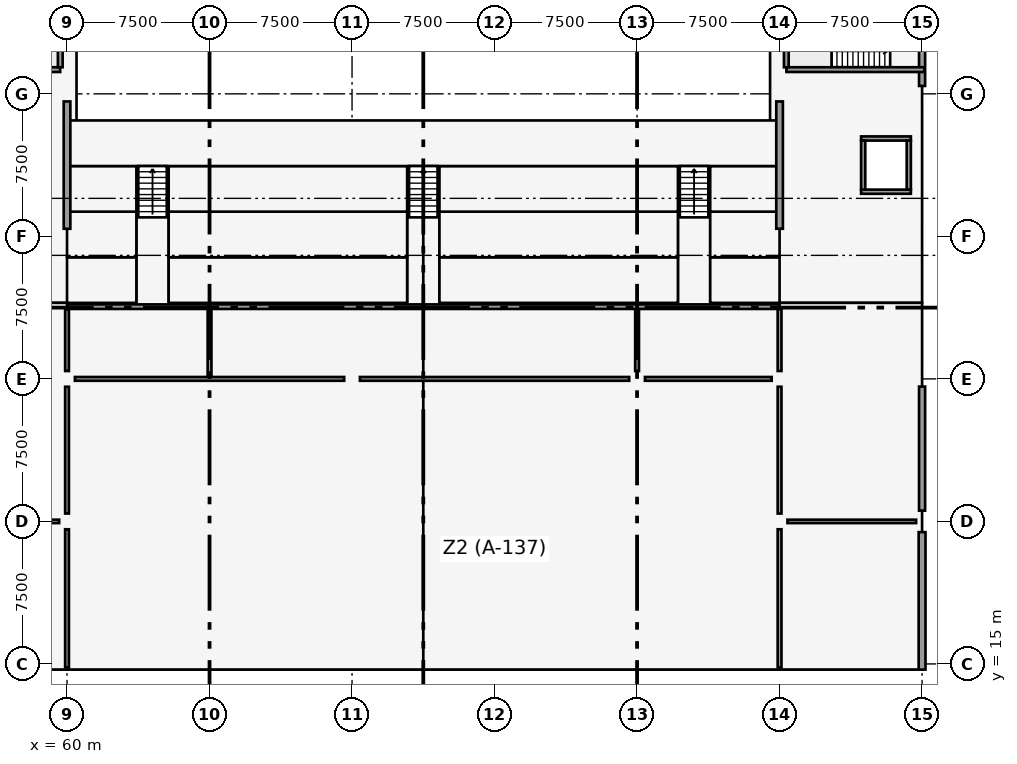
"""IFC4 building model, lengths in metres.
Left out: names, types, materials, properties, quantities, classifications, styles, units other than length and angle.
Written with IfcOpenShell. Run it as: python <this file> out.ifc"""

import sys

from ifc_helpers import new_model, si_unit, direction, frame, frame_2d, origin, origin_2d, place, context, subcontext, project, spatial, rectangle, extrude, element, fill, save


model = new_model("IFC4")
c1 = context("Model", 3, precision=1e-05, world=origin(), true_north=direction((0.0, 1.0)))
c2 = subcontext(c1, "Body", "Model", "MODEL_VIEW")
j1 = project(units=[si_unit("LENGTHUNIT", "METRE"), si_unit("PLANEANGLEUNIT", "RADIAN")], contexts=[c1])
p1 = place(None, origin())
s1 = spatial("IfcSite", under=j1, at=p1, CompositionType="ELEMENT")
p2 = place(p1, origin())
s2 = spatial("IfcBuilding", under=s1, at=p2, CompositionType="ELEMENT")
p3 = place(p2, frame((0.0, 0.0, 9.0)))
s3 = spatial("IfcBuildingStorey", under=s2, at=p3, CompositionType="ELEMENT", Elevation=9.0)
for number, where, z_axis, x_axis in (
    (1, (60.0, 22.5, 0.0), (0.0, 0.0, 1.0), (1.0, 0.0, 0.0)),
    (2, (60.0, 30.0, 0.0), (0.0, 0.0, 1.0), (1.0, 0.0, 0.0)),
    (3, (60.0, 37.5, 0.0), (0.0, 0.0, 1.0), (1.0, 0.0, 0.0)),
    (4, (60.0, 45.0, 0.0), (0.0, 0.0, 1.0), (1.0, 0.0, 0.0)),
    (5, (75.0, 22.5, 0.0), (0.0, 0.0, 1.0), (1.0, 0.0, 0.0)),
    (6, (75.0, 30.0, 0.0), (0.0, 0.0, 1.0), (1.0, 0.0, 0.0)),
    (7, (90.0, 22.5, 0.0), (0.0, 0.0, 1.0), (1.0, 0.0, 0.0)),
    (8, (90.0, 30.0, 0.0), (0.0, 0.0, 1.0), (1.0, 0.0, 0.0)),
    (9, (97.5, 22.5, 0.0), (0.0, 0.0, 1.0), (1.0, 0.0, 0.0)),
    (10, (97.5, 30.0, 0.0), (0.0, 0.0, 1.0), (1.0, 0.0, 0.0)),
    (11, (97.5, 37.5, 0.0), (0.0, 0.0, 1.0), (1.0, 0.0, 0.0)),
    (12, (97.5, 45.0, 0.0), (0.0, 0.0, 1.0), (1.0, 0.0, 0.0)),
):
    element("IfcColumn", number, at=place(p3, frame(where, z_axis=z_axis, x_axis=x_axis)), inside=s3, PredefinedType="COLUMN", context=c2, shape_type="SweptSolid", body=[
        extrude(rectangle(XDim=0.8, YDim=0.8, at=origin_2d()), origin(), (0.0, 0.0, 1.0), 4.2),
    ])
p4 = place(p3, frame((105.0, 22.5, 0.0), z_axis=(0.0, 0.0, 1.0), x_axis=(1.0, 0.0, 0.0)))
e13 = element("IfcColumn", 13, at=p4, inside=s3, PredefinedType="COLUMN", context=c2, shape_type="SweptSolid", body=[
    extrude(rectangle(XDim=0.6, YDim=1.1, at=origin_2d()), origin(), (0.0, 0.0, 1.0), 4.2),
])
for number, where, z_axis, x_axis in (
    (14, (105.0, 30.0, 0.0), (0.0, 0.0, 1.0), (1.0, 0.0, 0.0)),
    (15, (105.0, 37.5, 0.0), (0.0, 0.0, 1.0), (1.0, 0.0, 0.0)),
    (16, (105.0, 45.0, 0.0), (0.0, 0.0, 1.0), (1.0, 0.0, 0.0)),
):
    element("IfcColumn", number, at=place(p3, frame(where, z_axis=z_axis, x_axis=x_axis)), inside=s3, PredefinedType="COLUMN", context=c2, shape_type="SweptSolid", body=[
        extrude(rectangle(XDim=0.8, YDim=0.8, at=origin_2d()), origin(), (0.0, 0.0, 1.0), 4.2),
    ])
for number, where, z_axis, x_axis in (
    (17, (60.0, 37.9, 0.0), (0.0, 0.0, 1.0), (0.0, 1.0, 0.0)),
    (18, (97.5, 37.9, 0.0), (0.0, 0.0, 1.0), (0.0, 1.0, 0.0)),
):
    element("IfcWall", number, at=place(p3, frame(where, z_axis=z_axis, x_axis=x_axis)), inside=s3, PredefinedType="SHEAR", context=c2, shape_type="SweptSolid", body=[
        extrude(rectangle(XDim=6.7, YDim=0.35, at=frame_2d((3.35, 0.0))), origin(), (0.0, 0.0, 1.0), 2.72),
    ])
p5 = place(p3, frame((105.0, 14.7, 0.0), z_axis=(0.0, 0.0, 1.0), x_axis=(0.0, 1.0, 0.0)))
e19 = element("IfcWall", 19, at=p5, inside=s3, PredefinedType="SOLIDWALL", context=c2, shape_type="SweptSolid", body=[
    extrude(rectangle(XDim=7.235, YDim=0.36, at=frame_2d((3.618, 0.0))), origin(), (0.0, 0.0, 1.0), 2.69),
])
p6 = place(p3, frame((105.0, 23.065, 0.0), z_axis=(0.0, 0.0, 1.0), x_axis=(0.0, 1.0, 0.0)))
e20 = element("IfcWall", 20, at=p6, inside=s3, PredefinedType="SOLIDWALL", context=c2, shape_type="SweptSolid", body=[
    extrude(rectangle(XDim=6.53, YDim=0.32, at=frame_2d((3.265, 0.0))), origin(), (0.0, 0.0, 1.0), 2.69),
])
p7 = place(p3, frame((105.0, 45.415, 0.0), z_axis=(0.0, 0.0, 1.0), x_axis=(0.0, 1.0, 0.0)))
e21 = element("IfcWall", 21, at=p7, inside=s3, PredefinedType="SOLIDWALL", context=c2, shape_type="SweptSolid", body=[
    extrude(rectangle(XDim=6.67, YDim=0.32, at=frame_2d((3.335, 0.0))), origin(), (0.0, 0.0, 1.0), 2.92),
])
p8 = place(p3, frame((52.38, 46.275, 0.0), z_axis=(0.0, 0.0, 1.0), x_axis=(1.0, 0.0, 0.0)))
e22 = element("IfcWall", 22, at=p8, inside=s3, PredefinedType="SOLIDWALL", context=c2, shape_type="SweptSolid", body=[
    extrude(rectangle(XDim=7.26, YDim=0.25, at=frame_2d((3.63, 0.0))), origin(), (0.0, 0.0, 1.0), 3.92),
])
p9 = place(p8, frame((0.62, 0.0, 0.0)))
e23 = element("IfcOpeningElement", 23, at=p9, cuts=e22, PredefinedType="OPENING", context=c2, shape_type="SweptSolid", body=[
    extrude(rectangle(XDim=1.1, YDim=2.15, at=frame_2d((0.55, 1.075))), frame((0.0, 0.135, 0.0), z_axis=(0.0, -1.0, 0.0), x_axis=(1.0, 0.0, 0.0)), (0.0, 0.0, 1.0), 0.27),
])
p10 = place(p3, frame((59.645, 46.4, 0.0), z_axis=(0.0, 0.0, 1.0), x_axis=(0.0, 1.0, 0.0)))
e24 = element("IfcWall", 24, at=p10, inside=s3, PredefinedType="SOLIDWALL", context=c2, shape_type="SweptSolid", body=[
    extrude(rectangle(XDim=3.56, YDim=0.25, at=frame_2d((1.78, 0.0))), origin(), (0.0, 0.0, 1.0), 3.92),
])
p11 = place(p3, frame((97.86, 46.275, 0.0), z_axis=(0.0, 0.0, 1.0), x_axis=(1.0, 0.0, 0.0)))
e25 = element("IfcWall", 25, at=p11, inside=s3, PredefinedType="SOLIDWALL", context=c2, shape_type="SweptSolid", body=[
    extrude(rectangle(XDim=7.26, YDim=0.25, at=frame_2d((3.63, 0.0))), origin(), (0.0, 0.0, 1.0), 3.92),
])
p12 = place(p11, frame((5.54, 0.0, 0.0)))
e26 = element("IfcOpeningElement", 26, at=p12, cuts=e25, PredefinedType="OPENING", context=c2, shape_type="SweptSolid", body=[
    extrude(rectangle(XDim=1.1, YDim=2.15, at=frame_2d((0.55, 1.075))), frame((0.0, 0.135, 0.0), z_axis=(0.0, -1.0, 0.0), x_axis=(1.0, 0.0, 0.0)), (0.0, 0.0, 1.0), 0.27),
])
p13 = place(p3, frame((97.855, 46.4, 0.0), z_axis=(0.0, 0.0, 1.0), x_axis=(0.0, 1.0, 0.0)))
e27 = element("IfcWall", 27, at=p13, inside=s3, PredefinedType="SOLIDWALL", context=c2, shape_type="SweptSolid", body=[
    extrude(rectangle(XDim=3.56, YDim=0.25, at=frame_2d((1.78, 0.0))), origin(), (0.0, 0.0, 1.0), 3.92),
])
for number, where, z_axis, x_axis in (
    (28, (101.79, 39.85, 0.0), (0.0, 0.0, 1.0), (1.0, 0.0, 0.0)),
    (29, (101.79, 42.65, 0.0), (0.0, 0.0, 1.0), (1.0, 0.0, 0.0)),
):
    element("IfcWall", number, at=place(p3, frame(where, z_axis=z_axis, x_axis=x_axis)), inside=s3, PredefinedType="SOLIDWALL", context=c2, shape_type="SweptSolid", body=[
        extrude(rectangle(XDim=2.62, YDim=0.22, at=frame_2d((1.31, 0.0))), origin(), (0.0, 0.0, 1.0), 3.92),
    ])
p14 = place(p3, frame((101.9, 39.96, 0.0), z_axis=(0.0, 0.0, 1.0), x_axis=(0.0, 1.0, 0.0)))
e30 = element("IfcWall", 30, at=p14, inside=s3, PredefinedType="SOLIDWALL", context=c2, shape_type="SweptSolid", body=[
    extrude(rectangle(XDim=2.58, YDim=0.22, at=frame_2d((1.29, 0.0))), origin(), (0.0, 0.0, 1.0), 3.92),
])
p15 = place(p14, frame((0.79, 0.0, 0.0)))
e31 = element("IfcOpeningElement", 31, at=p15, cuts=e30, PredefinedType="OPENING", context=c2, shape_type="SweptSolid", body=[
    extrude(rectangle(XDim=1.0, YDim=2.15, at=frame_2d((0.5, 1.075))), frame((0.0, 0.12, 0.0), z_axis=(0.0, -1.0, 0.0), x_axis=(1.0, 0.0, 0.0)), (0.0, 0.0, 1.0), 0.24),
])
p16 = place(p3, frame((104.3, 39.96, 0.0), z_axis=(0.0, 0.0, 1.0), x_axis=(0.0, 1.0, 0.0)))
e32 = element("IfcWall", 32, at=p16, inside=s3, PredefinedType="SOLIDWALL", context=c2, shape_type="SweptSolid", body=[
    extrude(rectangle(XDim=2.58, YDim=0.22, at=frame_2d((1.29, 0.0))), origin(), (0.0, 0.0, 1.0), 3.92),
])
p17 = place(p3, frame((52.814, 22.5, 0.0), z_axis=(0.0, 0.0, 1.0), x_axis=(1.0, 0.0, 0.0)))
e33 = element("IfcWall", 33, at=p17, inside=s3, PredefinedType="PARTITIONING", context=c2, shape_type="SweptSolid", body=[
    extrude(rectangle(XDim=6.772, YDim=0.18, at=frame_2d((3.386, 0.0))), origin(), (0.0, 0.0, 1.0), 2.69),
])
p18 = place(p17, frame((2.786, 0.0, 0.0)))
e34 = element("IfcOpeningElement", 34, at=p18, cuts=e33, PredefinedType="OPENING", context=c2, shape_type="SweptSolid", body=[
    extrude(rectangle(XDim=1.3, YDim=2.15, at=frame_2d((0.65, 1.075))), frame((0.0, 0.1, 0.0), z_axis=(0.0, -1.0, 0.0), x_axis=(1.0, 0.0, 0.0)), (0.0, 0.0, 1.0), 0.2),
])
p19 = place(p3, frame((97.914, 22.5, 0.0), z_axis=(0.0, 0.0, 1.0), x_axis=(1.0, 0.0, 0.0)))
e35 = element("IfcWall", 35, at=p19, inside=s3, PredefinedType="PARTITIONING", context=c2, shape_type="SweptSolid", body=[
    extrude(rectangle(XDim=6.772, YDim=0.18, at=frame_2d((3.386, 0.0))), origin(), (0.0, 0.0, 1.0), 2.69),
])
p20 = place(p19, frame((2.686, 0.0, 0.0)))
e36 = element("IfcOpeningElement", 36, at=p20, cuts=e35, PredefinedType="OPENING", context=c2, shape_type="SweptSolid", body=[
    extrude(rectangle(XDim=1.3, YDim=2.15, at=frame_2d((0.65, 1.075))), frame((0.0, 0.1, 0.0), z_axis=(0.0, -1.0, 0.0), x_axis=(1.0, 0.0, 0.0)), (0.0, 0.0, 1.0), 0.2),
])
p21 = place(p3, frame((60.414, 30.0, 0.0), z_axis=(0.0, 0.0, 1.0), x_axis=(1.0, 0.0, 0.0)))
e37 = element("IfcWall", 37, at=p21, inside=s3, PredefinedType="PARTITIONING", context=c2, shape_type="SweptSolid", body=[
    extrude(rectangle(XDim=14.172, YDim=0.2, at=frame_2d((7.086, 0.0))), origin(), (0.0, 0.0, 1.0), 2.69),
])
p22 = place(p21, frame((2.586, 0.0, 0.0)))
e38 = element("IfcOpeningElement", 38, at=p22, cuts=e37, PredefinedType="OPENING", context=c2, shape_type="SweptSolid", body=[
    extrude(rectangle(XDim=1.5, YDim=2.16, at=frame_2d((0.75, 1.08))), frame((0.0, 0.11, 0.0), z_axis=(0.0, -1.0, 0.0), x_axis=(1.0, 0.0, 0.0)), (0.0, 0.0, 1.0), 0.22),
])
p23 = place(p3, frame((75.414, 30.0, 0.0), z_axis=(0.0, 0.0, 1.0), x_axis=(1.0, 0.0, 0.0)))
e39 = element("IfcWall", 39, at=p23, inside=s3, PredefinedType="PARTITIONING", context=c2, shape_type="SweptSolid", body=[
    extrude(rectangle(XDim=14.172, YDim=0.2, at=frame_2d((7.086, 0.0))), origin(), (0.0, 0.0, 1.0), 2.82),
])
p24 = place(p3, frame((90.414, 30.0, 0.0), z_axis=(0.0, 0.0, 1.0), x_axis=(1.0, 0.0, 0.0)))
e40 = element("IfcWall", 40, at=p24, inside=s3, PredefinedType="PARTITIONING", context=c2, shape_type="SweptSolid", body=[
    extrude(rectangle(XDim=6.672, YDim=0.2, at=frame_2d((3.336, 0.0))), origin(), (0.0, 0.0, 1.0), 2.69),
])
p25 = place(p24, frame((2.586, 0.0, 0.0)))
e41 = element("IfcOpeningElement", 41, at=p25, cuts=e40, PredefinedType="OPENING", context=c2, shape_type="SweptSolid", body=[
    extrude(rectangle(XDim=1.5, YDim=2.16, at=frame_2d((0.75, 1.08))), frame((0.0, 0.11, 0.0), z_axis=(0.0, -1.0, 0.0), x_axis=(1.0, 0.0, 0.0)), (0.0, 0.0, 1.0), 0.22),
])
p26 = place(p3, frame((60.0, 33.8, 0.0), z_axis=(0.0, 0.0, 1.0), x_axis=(1.0, 0.0, 0.0)))
e42 = element("IfcWall", 42, at=p26, inside=s3, PredefinedType="PARTITIONING", context=c2, shape_type="SweptSolid", body=[
    extrude(rectangle(XDim=37.5, YDim=0.24, at=frame_2d((18.75, 0.0))), origin(), (0.0, 0.0, 1.0), 2.69),
])
p27 = place(p26, frame((2.95, 0.0, 0.0)))
e43 = element("IfcOpeningElement", 43, at=p27, cuts=e42, PredefinedType="OPENING", context=c2, shape_type="SweptSolid", body=[
    extrude(rectangle(XDim=1.6, YDim=2.16, at=frame_2d((0.8, 1.08))), frame((0.0, 0.13, 0.0), z_axis=(0.0, -1.0, 0.0), x_axis=(1.0, 0.0, 0.0)), (0.0, 0.0, 1.0), 0.26),
])
p28 = place(p26, frame((32.95, 0.0, 0.0)))
e44 = element("IfcOpeningElement", 44, at=p28, cuts=e42, PredefinedType="OPENING", context=c2, shape_type="SweptSolid", body=[
    extrude(rectangle(XDim=1.6, YDim=2.16, at=frame_2d((0.8, 1.08))), frame((0.0, 0.13, 0.0), z_axis=(0.0, -1.0, 0.0), x_axis=(1.0, 0.0, 0.0)), (0.0, 0.0, 1.0), 0.26),
])
p29 = place(p3, frame((67.5, 30.114, 0.0), z_axis=(0.0, 0.0, 1.0), x_axis=(0.0, 1.0, 0.0)))
e45 = element("IfcWall", 45, at=p29, inside=s3, PredefinedType="PARTITIONING", context=c2, shape_type="SweptSolid", body=[
    extrude(rectangle(XDim=3.552, YDim=0.2, at=frame_2d((1.776, 0.0))), origin(), (0.0, 0.0, 1.0), 2.87),
])
p30 = place(p3, frame((90.0, 30.414, 0.0), z_axis=(0.0, 0.0, 1.0), x_axis=(0.0, 1.0, 0.0)))
e46 = element("IfcWall", 46, at=p30, inside=s3, PredefinedType="PARTITIONING", context=c2, shape_type="SweptSolid", body=[
    extrude(rectangle(XDim=3.252, YDim=0.2, at=frame_2d((1.626, 0.0))), origin(), (0.0, 0.0, 1.0), 2.82),
])
p31 = place(p3, frame((60.0, 14.82, 0.0), z_axis=(0.0, 0.0, 1.0), x_axis=(0.0, 1.0, 0.0)))
e47 = element("IfcWall", 47, at=p31, inside=s3, PredefinedType="PARTITIONING", context=c2, shape_type="SweptSolid", body=[
    extrude(rectangle(XDim=7.266, YDim=0.2, at=frame_2d((3.633, 0.0))), origin(), (0.0, 0.0, 1.0), 2.69),
])
p32 = place(p3, frame((60.0, 22.914, 0.0), z_axis=(0.0, 0.0, 1.0), x_axis=(0.0, 1.0, 0.0)))
e48 = element("IfcWall", 48, at=p32, inside=s3, PredefinedType="PARTITIONING", context=c2, shape_type="SweptSolid", body=[
    extrude(rectangle(XDim=6.672, YDim=0.2, at=frame_2d((3.336, 0.0))), origin(), (0.0, 0.0, 1.0), 2.69),
])
p33 = place(p32, frame((2.536, 0.0, 0.0)))
e49 = element("IfcOpeningElement", 49, at=p33, cuts=e48, PredefinedType="OPENING", context=c2, shape_type="SweptSolid", body=[
    extrude(rectangle(XDim=1.6, YDim=2.15, at=frame_2d((0.8, 1.075))), frame((0.0, 0.11, 0.0), z_axis=(0.0, -1.0, 0.0), x_axis=(1.0, 0.0, 0.0)), (0.0, 0.0, 1.0), 0.22),
])
p34 = place(p3, frame((60.0, 30.414, 0.0), z_axis=(0.0, 0.0, 1.0), x_axis=(0.0, 1.0, 0.0)))
e50 = element("IfcWall", 50, at=p34, inside=s3, PredefinedType="PARTITIONING", context=c2, shape_type="SweptSolid", body=[
    extrude(rectangle(XDim=3.252, YDim=0.2, at=frame_2d((1.626, 0.0))), origin(), (0.0, 0.0, 1.0), 2.69),
])
p35 = place(p34, frame((0.686, 0.0, 0.0)))
e51 = element("IfcOpeningElement", 51, at=p35, cuts=e50, PredefinedType="OPENING", context=c2, shape_type="SweptSolid", body=[
    extrude(rectangle(XDim=1.6, YDim=2.16, at=frame_2d((0.8, 1.08))), frame((0.0, 0.11, 0.0), z_axis=(0.0, -1.0, 0.0), x_axis=(1.0, 0.0, 0.0)), (0.0, 0.0, 1.0), 0.22),
])
p36 = place(p3, frame((97.5, 14.82, 0.0), z_axis=(0.0, 0.0, 1.0), x_axis=(0.0, 1.0, 0.0)))
e52 = element("IfcWall", 52, at=p36, inside=s3, PredefinedType="PARTITIONING", context=c2, shape_type="SweptSolid", body=[
    extrude(rectangle(XDim=7.266, YDim=0.2, at=frame_2d((3.633, 0.0))), origin(), (0.0, 0.0, 1.0), 2.69),
])
p37 = place(p3, frame((97.5, 22.914, 0.0), z_axis=(0.0, 0.0, 1.0), x_axis=(0.0, 1.0, 0.0)))
e53 = element("IfcWall", 53, at=p37, inside=s3, PredefinedType="PARTITIONING", context=c2, shape_type="SweptSolid", body=[
    extrude(rectangle(XDim=6.672, YDim=0.2, at=frame_2d((3.336, 0.0))), origin(), (0.0, 0.0, 1.0), 2.69),
])
p38 = place(p37, frame((2.536, 0.0, 0.0)))
e54 = element("IfcOpeningElement", 54, at=p38, cuts=e53, PredefinedType="OPENING", context=c2, shape_type="SweptSolid", body=[
    extrude(rectangle(XDim=1.6, YDim=2.15, at=frame_2d((0.8, 1.075))), frame((0.0, 0.11, 0.0), z_axis=(0.0, -1.0, 0.0), x_axis=(1.0, 0.0, 0.0)), (0.0, 0.0, 1.0), 0.22),
])
p39 = place(p3, frame((97.5, 30.414, 0.0), z_axis=(0.0, 0.0, 1.0), x_axis=(0.0, 1.0, 0.0)))
e55 = element("IfcWall", 55, at=p39, inside=s3, PredefinedType="PARTITIONING", context=c2, shape_type="SweptSolid", body=[
    extrude(rectangle(XDim=3.252, YDim=0.2, at=frame_2d((1.626, 0.0))), origin(), (0.0, 0.0, 1.0), 2.69),
])
p40 = place(p39, frame((0.686, 0.0, 0.0)))
e56 = element("IfcOpeningElement", 56, at=p40, cuts=e55, PredefinedType="OPENING", context=c2, shape_type="SweptSolid", body=[
    extrude(rectangle(XDim=1.6, YDim=2.16, at=frame_2d((0.8, 1.08))), frame((0.0, 0.11, 0.0), z_axis=(0.0, -1.0, 0.0), x_axis=(1.0, 0.0, 0.0)), (0.0, 0.0, 1.0), 0.22),
])
p41 = place(p12, origin())
e57 = element("IfcDoor", 57, at=p41, inside=s3, OperationType="SINGLE_SWING_LEFT", PredefinedType="DOOR", context=c2, shape_type="SweptSolid", body=[
    extrude(rectangle(XDim=1.1, YDim=2.15, at=frame_2d((0.55, 1.075))), frame((0.0, 0.025, 0.0), z_axis=(0.0, -1.0, 0.0), x_axis=(1.0, 0.0, 0.0)), (0.0, 0.0, 1.0), 0.05),
])
fill(e26, e57)
p42 = place(p15, origin())
e58 = element("IfcDoor", 58, at=p42, inside=s3, OperationType="SLIDING_TO_LEFT", PredefinedType="DOOR", context=c2, shape_type="SweptSolid", body=[
    extrude(rectangle(XDim=1.0, YDim=2.15, at=frame_2d((0.5, 1.075))), frame((0.0, 0.025, 0.0), z_axis=(0.0, -1.0, 0.0), x_axis=(1.0, 0.0, 0.0)), (0.0, 0.0, 1.0), 0.05),
])
fill(e31, e58)
p43 = place(p20, origin())
e59 = element("IfcDoor", 59, at=p43, inside=s3, OperationType="SINGLE_SWING_LEFT", PredefinedType="DOOR", context=c2, shape_type="SweptSolid", body=[
    extrude(rectangle(XDim=1.3, YDim=2.15, at=frame_2d((0.65, 1.075))), frame((0.0, 0.025, 0.0), z_axis=(0.0, -1.0, 0.0), x_axis=(1.0, 0.0, 0.0)), (0.0, 0.0, 1.0), 0.05),
])
fill(e36, e59)
p44 = place(p22, origin())
e60 = element("IfcDoor", 60, at=p44, inside=s3, OperationType="SINGLE_SWING_RIGHT", PredefinedType="DOOR", context=c2, shape_type="SweptSolid", body=[
    extrude(rectangle(XDim=1.5, YDim=2.16, at=frame_2d((0.75, 1.08))), frame((0.0, 0.025, 0.0), z_axis=(0.0, -1.0, 0.0), x_axis=(1.0, 0.0, 0.0)), (0.0, 0.0, 1.0), 0.05),
])
fill(e38, e60)
p45 = place(p25, origin())
e61 = element("IfcDoor", 61, at=p45, inside=s3, OperationType="SINGLE_SWING_LEFT", PredefinedType="DOOR", context=c2, shape_type="SweptSolid", body=[
    extrude(rectangle(XDim=1.5, YDim=2.16, at=frame_2d((0.75, 1.08))), frame((0.0, 0.025, 0.0), z_axis=(0.0, -1.0, 0.0), x_axis=(1.0, 0.0, 0.0)), (0.0, 0.0, 1.0), 0.05),
])
fill(e41, e61)
p46 = place(p27, origin())
e62 = element("IfcDoor", 62, at=p46, inside=s3, OperationType="SINGLE_SWING_RIGHT", PredefinedType="DOOR", context=c2, shape_type="SweptSolid", body=[
    extrude(rectangle(XDim=1.6, YDim=2.16, at=frame_2d((0.8, 1.08))), frame((0.0, 0.025, 0.0), z_axis=(0.0, -1.0, 0.0), x_axis=(1.0, 0.0, 0.0)), (0.0, 0.0, 1.0), 0.05),
])
fill(e43, e62)
p47 = place(p28, origin())
e63 = element("IfcDoor", 63, at=p47, inside=s3, OperationType="SINGLE_SWING_LEFT", PredefinedType="DOOR", context=c2, shape_type="SweptSolid", body=[
    extrude(rectangle(XDim=1.6, YDim=2.16, at=frame_2d((0.8, 1.08))), frame((0.0, 0.025, 0.0), z_axis=(0.0, -1.0, 0.0), x_axis=(1.0, 0.0, 0.0)), (0.0, 0.0, 1.0), 0.05),
])
fill(e44, e63)
p48 = place(p33, origin())
e64 = element("IfcDoor", 64, at=p48, inside=s3, OperationType="SINGLE_SWING_RIGHT", PredefinedType="DOOR", context=c2, shape_type="SweptSolid", body=[
    extrude(rectangle(XDim=1.6, YDim=2.15, at=frame_2d((0.8, 1.075))), frame((0.0, 0.025, 0.0), z_axis=(0.0, -1.0, 0.0), x_axis=(1.0, 0.0, 0.0)), (0.0, 0.0, 1.0), 0.05),
])
fill(e49, e64)
p49 = place(p35, origin())
e65 = element("IfcDoor", 65, at=p49, inside=s3, OperationType="SINGLE_SWING_LEFT", PredefinedType="DOOR", context=c2, shape_type="SweptSolid", body=[
    extrude(rectangle(XDim=1.6, YDim=2.16, at=frame_2d((0.8, 1.08))), frame((0.0, 0.025, 0.0), z_axis=(0.0, -1.0, 0.0), x_axis=(1.0, 0.0, 0.0)), (0.0, 0.0, 1.0), 0.05),
])
fill(e51, e65)
p50 = place(p38, origin())
e66 = element("IfcDoor", 66, at=p50, inside=s3, OperationType="SINGLE_SWING_RIGHT", PredefinedType="DOOR", context=c2, shape_type="SweptSolid", body=[
    extrude(rectangle(XDim=1.6, YDim=2.15, at=frame_2d((0.8, 1.075))), frame((0.0, 0.025, 0.0), z_axis=(0.0, -1.0, 0.0), x_axis=(1.0, 0.0, 0.0)), (0.0, 0.0, 1.0), 0.05),
])
fill(e54, e66)
p51 = place(p40, origin())
e67 = element("IfcDoor", 67, at=p51, inside=s3, OperationType="SINGLE_SWING_LEFT", PredefinedType="DOOR", context=c2, shape_type="SweptSolid", body=[
    extrude(rectangle(XDim=1.6, YDim=2.16, at=frame_2d((0.8, 1.08))), frame((0.0, 0.025, 0.0), z_axis=(0.0, -1.0, 0.0), x_axis=(1.0, 0.0, 0.0)), (0.0, 0.0, 1.0), 0.05),
])
fill(e56, e67)
save(model, sys.argv[1])
